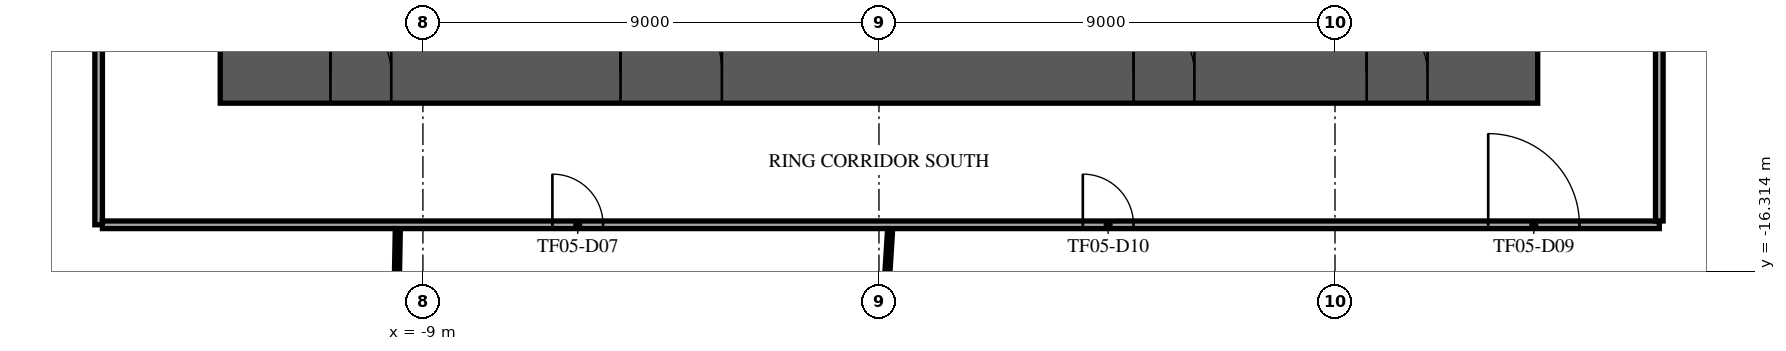
"""IFC4 building model, lengths in metres.
Left out: names, types, materials, properties, quantities, classifications, styles, units other than length and angle.
Written with IfcOpenShell. Run it as: python <this file> out.ifc"""

import sys

from ifc_helpers import new_model, si_unit, direction, frame, frame_2d, origin, place, context, subcontext, project, spatial, rectangle, extrude, element, fill, save


model = new_model("IFC4")
c1 = context("Model", 3, precision=1e-05, world=origin(), true_north=direction((0.0, 1.0)))
c2 = subcontext(c1, "Body", "Model", "MODEL_VIEW")
j1 = project(units=[si_unit("LENGTHUNIT", "METRE"), si_unit("PLANEANGLEUNIT", "RADIAN")], contexts=[c1])
p1 = place(None, origin())
s1 = spatial("IfcSite", under=j1, at=p1, CompositionType="ELEMENT")
p2 = place(p1, origin())
s2 = spatial("IfcBuilding", under=s1, at=p2, CompositionType="ELEMENT")
p3 = place(p2, frame((0.0, 0.0, 22.5)))
s3 = spatial("IfcBuildingStorey", under=s2, at=p3, CompositionType="ELEMENT", Elevation=22.5)
p4 = place(p3, frame((-13.0, -12.4, 0.0), z_axis=(0.0, 0.0, 1.0), x_axis=(1.0, 0.0, 0.0)))
e1 = element("IfcWall", 1, at=p4, inside=s3, PredefinedType="SHEAR", context=c2, shape_type="SweptSolid", body=[
    extrude(rectangle(XDim=26.0, YDim=1.2, at=frame_2d((13.0, 0.0))), origin(), (0.0, 0.0, 1.0), 4.35),
])
p5 = place(p4, frame((7.9, 0.0, 0.0)))
e2 = element("IfcOpeningElement", 2, at=p5, cuts=e1, PredefinedType="OPENING", context=c2, shape_type="SweptSolid", body=[
    extrude(rectangle(XDim=2.0, YDim=2.1, at=frame_2d((1.0, 1.05))), frame((0.0, 0.61, 0.0), z_axis=(0.0, -1.0, 0.0), x_axis=(1.0, 0.0, 0.0)), (0.0, 0.0, 1.0), 1.22),
])
p6 = place(p4, frame((18.025, 0.0, 0.0)))
e3 = element("IfcOpeningElement", 3, at=p6, cuts=e1, PredefinedType="OPENING", context=c2, shape_type="SweptSolid", body=[
    extrude(rectangle(XDim=1.2, YDim=2.1, at=frame_2d((0.6, 1.05))), frame((0.0, 0.61, 0.0), z_axis=(0.0, -1.0, 0.0), x_axis=(1.0, 0.0, 0.0)), (0.0, 0.0, 1.0), 1.22),
])
p7 = place(p4, frame((2.175, 0.0, 0.0)))
e4 = element("IfcOpeningElement", 4, at=p7, cuts=e1, PredefinedType="OPENING", context=c2, shape_type="SweptSolid", body=[
    extrude(rectangle(XDim=1.2, YDim=2.1, at=frame_2d((0.6, 1.05))), frame((0.0, 0.61, 0.0), z_axis=(0.0, -1.0, 0.0), x_axis=(1.0, 0.0, 0.0)), (0.0, 0.0, 1.0), 1.22),
])
p8 = place(p4, frame((22.625, 0.0, 0.0)))
e5 = element("IfcOpeningElement", 5, at=p8, cuts=e1, PredefinedType="OPENING", context=c2, shape_type="SweptSolid", body=[
    extrude(rectangle(XDim=1.2, YDim=2.1, at=frame_2d((0.6, 1.05))), frame((0.0, 0.61, 0.0), z_axis=(0.0, -1.0, 0.0), x_axis=(1.0, 0.0, 0.0)), (0.0, 0.0, 1.0), 1.22),
])
p9 = place(p3, frame((-15.4, -15.4, 0.0), z_axis=(0.0, 0.0, 1.0), x_axis=(0.0, 1.0, 0.0)))
e6 = element("IfcWall", 6, at=p9, inside=s3, PredefinedType="PARTITIONING", context=c2, shape_type="SweptSolid", body=[
    extrude(rectangle(XDim=30.8, YDim=0.15, at=frame_2d((15.4, 0.0))), origin(), (0.0, 0.0, 1.0), 3.85),
])
p10 = place(p9, frame((17.342, 0.0, 0.0)))
e7 = element("IfcOpeningElement", 7, at=p10, cuts=e6, PredefinedType="OPENING", context=c2, shape_type="SweptSolid", body=[
    extrude(rectangle(XDim=1.8, YDim=2.1, at=frame_2d((0.9, 1.05))), frame((0.0, 0.085, 0.0), z_axis=(0.0, -1.0, 0.0), x_axis=(1.0, 0.0, 0.0)), (0.0, 0.0, 1.0), 0.17),
])
p11 = place(p9, frame((21.842, 0.0, 0.0)))
e8 = element("IfcOpeningElement", 8, at=p11, cuts=e6, PredefinedType="OPENING", context=c2, shape_type="SweptSolid", body=[
    extrude(rectangle(XDim=1.0, YDim=2.1, at=frame_2d((0.5, 1.05))), frame((0.0, 0.085, 0.0), z_axis=(0.0, -1.0, 0.0), x_axis=(1.0, 0.0, 0.0)), (0.0, 0.0, 1.0), 0.17),
])
p12 = place(p9, frame((4.05, 0.0, 0.0)))
e9 = element("IfcOpeningElement", 9, at=p12, cuts=e6, PredefinedType="OPENING", context=c2, shape_type="SweptSolid", body=[
    extrude(rectangle(XDim=1.8, YDim=2.1, at=frame_2d((0.9, 1.05))), frame((0.0, 0.085, 0.0), z_axis=(0.0, -1.0, 0.0), x_axis=(1.0, 0.0, 0.0)), (0.0, 0.0, 1.0), 0.17),
])
p13 = place(p9, frame((10.05, 0.0, 0.0)))
e10 = element("IfcOpeningElement", 10, at=p13, cuts=e6, PredefinedType="OPENING", context=c2, shape_type="SweptSolid", body=[
    extrude(rectangle(XDim=1.0, YDim=2.1, at=frame_2d((0.5, 1.05))), frame((0.0, 0.085, 0.0), z_axis=(0.0, -1.0, 0.0), x_axis=(1.0, 0.0, 0.0)), (0.0, 0.0, 1.0), 0.17),
])
p14 = place(p9, frame((24.266, 0.0, 0.0)))
e11 = element("IfcOpeningElement", 11, at=p14, cuts=e6, PredefinedType="OPENING", context=c2, shape_type="SweptSolid", body=[
    extrude(rectangle(XDim=1.0, YDim=2.1, at=frame_2d((0.5, 1.05))), frame((0.0, 0.085, 0.0), z_axis=(0.0, -1.0, 0.0), x_axis=(1.0, 0.0, 0.0)), (0.0, 0.0, 1.0), 0.17),
])
p15 = place(p3, frame((-15.325, -15.4, 0.0), z_axis=(0.0, 0.0, 1.0), x_axis=(1.0, 0.0, 0.0)))
e12 = element("IfcWall", 12, at=p15, inside=s3, PredefinedType="PARTITIONING", context=c2, shape_type="SweptSolid", body=[
    extrude(rectangle(XDim=30.725, YDim=0.15, at=frame_2d((15.362, 0.0))), origin(), (0.0, 0.0, 1.0), 3.85),
])
p16 = place(p15, frame((8.88, 0.0, 0.0)))
e13 = element("IfcOpeningElement", 13, at=p16, cuts=e12, PredefinedType="OPENING", context=c2, shape_type="SweptSolid", body=[
    extrude(rectangle(XDim=1.0, YDim=2.1, at=frame_2d((0.5, 1.05))), frame((0.0, 0.085, 0.0), z_axis=(0.0, -1.0, 0.0), x_axis=(1.0, 0.0, 0.0)), (0.0, 0.0, 1.0), 0.17),
])
p17 = place(p15, frame((27.348, 0.0, 0.0)))
e14 = element("IfcOpeningElement", 14, at=p17, cuts=e12, PredefinedType="OPENING", context=c2, shape_type="SweptSolid", body=[
    extrude(rectangle(XDim=1.8, YDim=2.1, at=frame_2d((0.9, 1.05))), frame((0.0, 0.085, 0.0), z_axis=(0.0, -1.0, 0.0), x_axis=(1.0, 0.0, 0.0)), (0.0, 0.0, 1.0), 0.17),
])
p18 = place(p15, frame((19.348, 0.0, 0.0)))
e15 = element("IfcOpeningElement", 15, at=p18, cuts=e12, PredefinedType="OPENING", context=c2, shape_type="SweptSolid", body=[
    extrude(rectangle(XDim=1.0, YDim=2.1, at=frame_2d((0.5, 1.05))), frame((0.0, 0.085, 0.0), z_axis=(0.0, -1.0, 0.0), x_axis=(1.0, 0.0, 0.0)), (0.0, 0.0, 1.0), 0.17),
])
p19 = place(p3, frame((15.4, -15.325, 0.0), z_axis=(0.0, 0.0, 1.0), x_axis=(0.0, 1.0, 0.0)))
e16 = element("IfcWall", 16, at=p19, inside=s3, PredefinedType="PARTITIONING", context=c2, shape_type="SweptSolid", body=[
    extrude(rectangle(XDim=30.65, YDim=0.15, at=frame_2d((15.325, 0.0))), origin(), (0.0, 0.0, 1.0), 3.85),
])
p20 = place(p19, frame((25.068, 0.0, 0.0)))
e17 = element("IfcOpeningElement", 17, at=p20, cuts=e16, PredefinedType="OPENING", context=c2, shape_type="SweptSolid", body=[
    extrude(rectangle(XDim=1.8, YDim=2.1, at=frame_2d((0.9, 1.05))), frame((0.0, 0.085, 0.0), z_axis=(0.0, -1.0, 0.0), x_axis=(1.0, 0.0, 0.0)), (0.0, 0.0, 1.0), 0.17),
])
p21 = place(p19, frame((10.927, 0.0, 0.0)))
e18 = element("IfcOpeningElement", 18, at=p21, cuts=e16, PredefinedType="OPENING", context=c2, shape_type="SweptSolid", body=[
    extrude(rectangle(XDim=1.0, YDim=2.1, at=frame_2d((0.5, 1.05))), frame((0.0, 0.085, 0.0), z_axis=(0.0, -1.0, 0.0), x_axis=(1.0, 0.0, 0.0)), (0.0, 0.0, 1.0), 0.17),
])
p22 = place(p3, frame((-9.738, -28.409, 0.0), z_axis=(0.0, 0.0, 1.0), x_axis=(0.01874139866, 0.999824364564, 0.0)))
e19 = element("IfcWall", 19, at=p22, inside=s3, PredefinedType="PARTITIONING", context=c2, shape_type="SweptSolid", body=[
    extrude(rectangle(XDim=12.936, YDim=0.1, at=frame_2d((6.468, 0.0))), origin(), (0.0, 0.0, 1.0), 3.85),
])
p23 = place(p3, frame((-0.662, -29.473, 0.0), z_axis=(0.0, 0.0, 1.0), x_axis=(0.06297334424, 0.99801520926, 0.0)))
e20 = element("IfcWall", 20, at=p23, inside=s3, PredefinedType="PARTITIONING", context=c2, shape_type="SweptSolid", body=[
    extrude(rectangle(XDim=14.023, YDim=0.1, at=frame_2d((7.011, 0.0))), origin(), (0.0, 0.0, 1.0), 3.55),
])
p24 = place(p5, origin())
e21 = element("IfcDoor", 21, at=p24, inside=s3, OperationType="SINGLE_SWING_LEFT", PredefinedType="DOOR", context=c2, shape_type="SweptSolid", body=[
    extrude(rectangle(XDim=2.0, YDim=2.1, at=frame_2d((1.0, 1.05))), frame((0.0, 0.025, 0.0), z_axis=(0.0, -1.0, 0.0), x_axis=(1.0, 0.0, 0.0)), (0.0, 0.0, 1.0), 0.05),
])
fill(e2, e21)
p25 = place(p6, origin())
e22 = element("IfcDoor", 22, at=p25, inside=s3, OperationType="SINGLE_SWING_LEFT", PredefinedType="DOOR", context=c2, shape_type="SweptSolid", body=[
    extrude(rectangle(XDim=1.2, YDim=2.1, at=frame_2d((0.6, 1.05))), frame((0.0, 0.025, 0.0), z_axis=(0.0, -1.0, 0.0), x_axis=(1.0, 0.0, 0.0)), (0.0, 0.0, 1.0), 0.05),
])
fill(e3, e22)
p26 = place(p7, origin())
e23 = element("IfcDoor", 23, at=p26, inside=s3, OperationType="SINGLE_SWING_LEFT", PredefinedType="DOOR", context=c2, shape_type="SweptSolid", body=[
    extrude(rectangle(XDim=1.2, YDim=2.1, at=frame_2d((0.6, 1.05))), frame((0.0, 0.025, 0.0), z_axis=(0.0, -1.0, 0.0), x_axis=(1.0, 0.0, 0.0)), (0.0, 0.0, 1.0), 0.05),
])
fill(e4, e23)
p27 = place(p8, origin())
e24 = element("IfcDoor", 24, at=p27, inside=s3, OperationType="SINGLE_SWING_LEFT", PredefinedType="DOOR", context=c2, shape_type="SweptSolid", body=[
    extrude(rectangle(XDim=1.2, YDim=2.1, at=frame_2d((0.6, 1.05))), frame((0.0, 0.025, 0.0), z_axis=(0.0, -1.0, 0.0), x_axis=(1.0, 0.0, 0.0)), (0.0, 0.0, 1.0), 0.05),
])
fill(e5, e24)
p28 = place(p16, frame((1.0, 0.0, 0.0), z_axis=(0.0, 0.0, 1.0), x_axis=(-1.0, 0.0, 0.0)))
e25 = element("IfcDoor", 25, at=p28, inside=s3, OperationType="SINGLE_SWING_LEFT", PredefinedType="DOOR", context=c2, shape_type="SweptSolid", body=[
    extrude(rectangle(XDim=1.0, YDim=2.1, at=frame_2d((0.5, 1.05))), frame((0.0, 0.025, 0.0), z_axis=(0.0, -1.0, 0.0), x_axis=(1.0, 0.0, 0.0)), (0.0, 0.0, 1.0), 0.05),
])
fill(e13, e25)
p29 = place(p17, frame((1.8, 0.0, 0.0), z_axis=(0.0, 0.0, 1.0), x_axis=(-1.0, 0.0, 0.0)))
e26 = element("IfcDoor", 26, at=p29, inside=s3, OperationType="DOUBLE_DOOR_SINGLE_SWING", PredefinedType="DOOR", context=c2, shape_type="SweptSolid", body=[
    extrude(rectangle(XDim=1.8, YDim=2.1, at=frame_2d((0.9, 1.05))), frame((0.0, 0.025, 0.0), z_axis=(0.0, -1.0, 0.0), x_axis=(1.0, 0.0, 0.0)), (0.0, 0.0, 1.0), 0.05),
])
fill(e14, e26)
p30 = place(p18, frame((1.0, 0.0, 0.0), z_axis=(0.0, 0.0, 1.0), x_axis=(-1.0, 0.0, 0.0)))
e27 = element("IfcDoor", 27, at=p30, inside=s3, OperationType="SINGLE_SWING_RIGHT", PredefinedType="DOOR", context=c2, shape_type="SweptSolid", body=[
    extrude(rectangle(XDim=1.0, YDim=2.1, at=frame_2d((0.5, 1.05))), frame((0.0, 0.025, 0.0), z_axis=(0.0, -1.0, 0.0), x_axis=(1.0, 0.0, 0.0)), (0.0, 0.0, 1.0), 0.05),
])
fill(e15, e27)
save(model, sys.argv[1])
